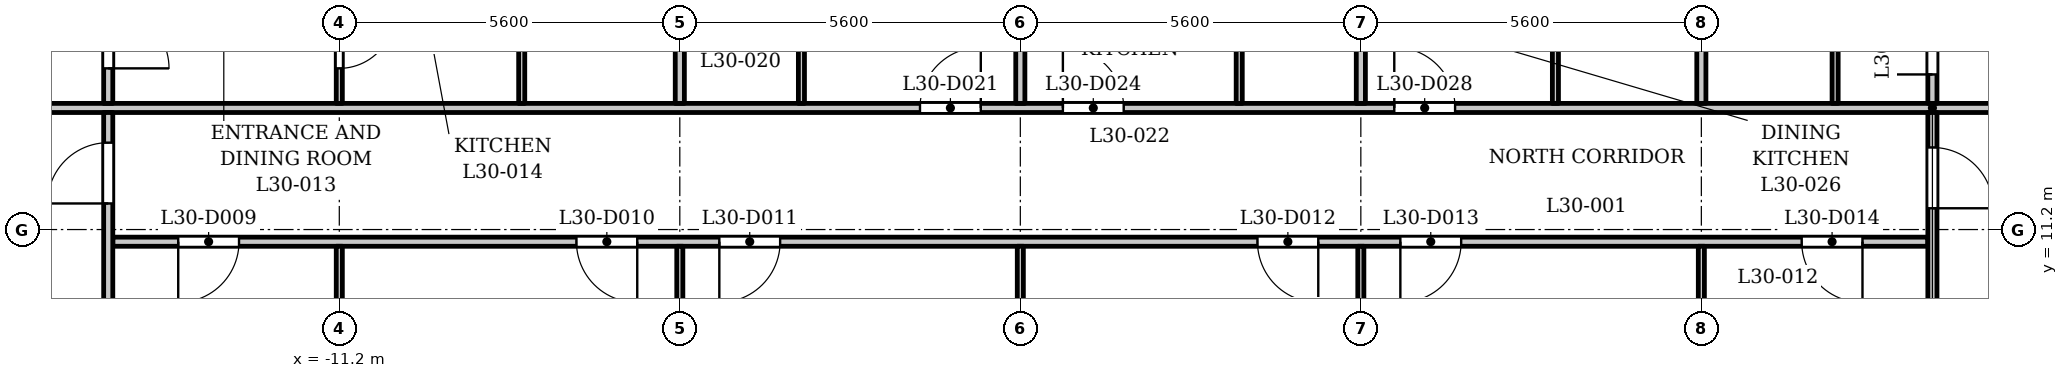
"""IFC4 building model, lengths in metres.
Left out: names, types, materials, properties, quantities, classifications, styles, units other than length and angle.
Written with IfcOpenShell. Run it as: python <this file> out.ifc"""

import sys

from ifc_helpers import new_model, si_unit, direction, frame, frame_2d, origin, place, context, subcontext, project, spatial, rectangle, extrude, element, fill, save


model = new_model("IFC4")
c1 = context("Model", 3, precision=1e-05, world=origin(), true_north=direction((0.0, 1.0)))
c2 = subcontext(c1, "Body", "Model", "MODEL_VIEW")
j1 = project(units=[si_unit("LENGTHUNIT", "METRE"), si_unit("PLANEANGLEUNIT", "RADIAN")], contexts=[c1])
p1 = place(None, origin())
s1 = spatial("IfcSite", under=j1, at=p1, CompositionType="ELEMENT")
p2 = place(p1, origin())
s2 = spatial("IfcBuilding", under=s1, at=p2, CompositionType="ELEMENT")
p3 = place(p2, frame((0.0, 0.0, 118.3)))
s3 = spatial("IfcBuildingStorey", under=s2, at=p3, CompositionType="ELEMENT", Elevation=118.3)
p4 = place(p3, frame((-14.925, 11.0, 0.0), z_axis=(0.0, 0.0, 1.0), x_axis=(1.0, 0.0, 0.0)))
e1 = element("IfcWall", 1, at=p4, inside=s3, PredefinedType="PARTITIONING", context=c2, shape_type="SweptSolid", body=[
    extrude(rectangle(XDim=29.85, YDim=0.15, at=frame_2d((14.925, 0.0))), origin(), (0.0, 0.0, 1.0), 3.2),
])
p5 = place(p4, frame((1.076, 0.0, 0.0)))
e2 = element("IfcOpeningElement", 2, at=p5, cuts=e1, PredefinedType="OPENING", context=c2, shape_type="SweptSolid", body=[
    extrude(rectangle(XDim=1.0, YDim=2.1, at=frame_2d((0.5, 1.05))), frame((0.0, 0.085, 0.0), z_axis=(0.0, -1.0, 0.0), x_axis=(1.0, 0.0, 0.0)), (0.0, 0.0, 1.0), 0.17),
])
p6 = place(p4, frame((7.625, 0.0, 0.0)))
e3 = element("IfcOpeningElement", 3, at=p6, cuts=e1, PredefinedType="OPENING", context=c2, shape_type="SweptSolid", body=[
    extrude(rectangle(XDim=1.0, YDim=2.1, at=frame_2d((0.5, 1.05))), frame((0.0, 0.085, 0.0), z_axis=(0.0, -1.0, 0.0), x_axis=(1.0, 0.0, 0.0)), (0.0, 0.0, 1.0), 0.17),
])
p7 = place(p4, frame((9.975, 0.0, 0.0)))
e4 = element("IfcOpeningElement", 4, at=p7, cuts=e1, PredefinedType="OPENING", context=c2, shape_type="SweptSolid", body=[
    extrude(rectangle(XDim=1.0, YDim=2.1, at=frame_2d((0.5, 1.05))), frame((0.0, 0.085, 0.0), z_axis=(0.0, -1.0, 0.0), x_axis=(1.0, 0.0, 0.0)), (0.0, 0.0, 1.0), 0.17),
])
p8 = place(p4, frame((18.825, 0.0, 0.0)))
e5 = element("IfcOpeningElement", 5, at=p8, cuts=e1, PredefinedType="OPENING", context=c2, shape_type="SweptSolid", body=[
    extrude(rectangle(XDim=1.0, YDim=2.1, at=frame_2d((0.5, 1.05))), frame((0.0, 0.085, 0.0), z_axis=(0.0, -1.0, 0.0), x_axis=(1.0, 0.0, 0.0)), (0.0, 0.0, 1.0), 0.17),
])
p9 = place(p4, frame((21.175, 0.0, 0.0)))
e6 = element("IfcOpeningElement", 6, at=p9, cuts=e1, PredefinedType="OPENING", context=c2, shape_type="SweptSolid", body=[
    extrude(rectangle(XDim=1.0, YDim=2.1, at=frame_2d((0.5, 1.05))), frame((0.0, 0.085, 0.0), z_axis=(0.0, -1.0, 0.0), x_axis=(1.0, 0.0, 0.0)), (0.0, 0.0, 1.0), 0.17),
])
p10 = place(p4, frame((27.775, 0.0, 0.0)))
e7 = element("IfcOpeningElement", 7, at=p10, cuts=e1, PredefinedType="OPENING", context=c2, shape_type="SweptSolid", body=[
    extrude(rectangle(XDim=1.0, YDim=2.1, at=frame_2d((0.5, 1.05))), frame((0.0, 0.085, 0.0), z_axis=(0.0, -1.0, 0.0), x_axis=(1.0, 0.0, 0.0)), (0.0, 0.0, 1.0), 0.17),
])
p11 = place(p3, frame((-17.4, 13.2, 0.0), z_axis=(0.0, 0.0, 1.0), x_axis=(1.0, 0.0, 0.0)))
e8 = element("IfcWall", 8, at=p11, inside=s3, PredefinedType="PARTITIONING", context=c2, shape_type="SweptSolid", body=[
    extrude(rectangle(XDim=34.8, YDim=0.15, at=frame_2d((17.4, 0.0))), origin(), (0.0, 0.0, 1.0), 3.2),
])
p12 = place(p11, frame((0.25, 0.0, 0.0)))
e9 = element("IfcOpeningElement", 9, at=p12, cuts=e8, PredefinedType="OPENING", context=c2, shape_type="SweptSolid", body=[
    extrude(rectangle(XDim=1.0, YDim=2.1, at=frame_2d((0.5, 1.05))), frame((0.0, 0.085, 0.0), z_axis=(0.0, -1.0, 0.0), x_axis=(1.0, 0.0, 0.0)), (0.0, 0.0, 1.0), 0.17),
])
p13 = place(p11, frame((33.65, 0.0, 0.0)))
e10 = element("IfcOpeningElement", 10, at=p13, cuts=e8, PredefinedType="OPENING", context=c2, shape_type="SweptSolid", body=[
    extrude(rectangle(XDim=1.0, YDim=2.1, at=frame_2d((0.5, 1.05))), frame((0.0, 0.085, 0.0), z_axis=(0.0, -1.0, 0.0), x_axis=(1.0, 0.0, 0.0)), (0.0, 0.0, 1.0), 0.17),
])
p14 = place(p11, frame((15.75, 0.0, 0.0)))
e11 = element("IfcOpeningElement", 11, at=p14, cuts=e8, PredefinedType="OPENING", context=c2, shape_type="SweptSolid", body=[
    extrude(rectangle(XDim=1.0, YDim=2.1, at=frame_2d((0.5, 1.05))), frame((0.0, 0.085, 0.0), z_axis=(0.0, -1.0, 0.0), x_axis=(1.0, 0.0, 0.0)), (0.0, 0.0, 1.0), 0.17),
])
p15 = place(p11, frame((18.1, 0.0, 0.0)))
e12 = element("IfcOpeningElement", 12, at=p15, cuts=e8, PredefinedType="OPENING", context=c2, shape_type="SweptSolid", body=[
    extrude(rectangle(XDim=1.0, YDim=2.1, at=frame_2d((0.5, 1.05))), frame((0.0, 0.085, 0.0), z_axis=(0.0, -1.0, 0.0), x_axis=(1.0, 0.0, 0.0)), (0.0, 0.0, 1.0), 0.17),
])
p16 = place(p11, frame((23.55, 0.0, 0.0)))
e13 = element("IfcOpeningElement", 13, at=p16, cuts=e8, PredefinedType="OPENING", context=c2, shape_type="SweptSolid", body=[
    extrude(rectangle(XDim=1.0, YDim=2.1, at=frame_2d((0.5, 1.05))), frame((0.0, 0.085, 0.0), z_axis=(0.0, -1.0, 0.0), x_axis=(1.0, 0.0, 0.0)), (0.0, 0.0, 1.0), 0.17),
])
p17 = place(p3, frame((-15.0, 6.769, 0.0), z_axis=(0.0, 0.0, 1.0), x_axis=(0.0, 1.0, 0.0)))
e14 = element("IfcWall", 14, at=p17, inside=s3, PredefinedType="PARTITIONING", context=c2, shape_type="SweptSolid", body=[
    extrude(rectangle(XDim=6.356, YDim=0.15, at=frame_2d((3.178, 0.0))), origin(), (0.0, 0.0, 1.0), 3.2),
])
p18 = place(p17, frame((4.86, 0.0, 0.0)))
e15 = element("IfcOpeningElement", 15, at=p18, cuts=e14, PredefinedType="OPENING", context=c2, shape_type="SweptSolid", body=[
    extrude(rectangle(XDim=1.0, YDim=2.1, at=frame_2d((0.5, 1.05))), frame((0.0, 0.085, 0.0), z_axis=(0.0, -1.0, 0.0), x_axis=(1.0, 0.0, 0.0)), (0.0, 0.0, 1.0), 0.17),
])
p19 = place(p3, frame((-15.0, 13.275, 0.0), z_axis=(0.0, 0.0, 1.0), x_axis=(0.0, 1.0, 0.0)))
e16 = element("IfcWall", 16, at=p19, inside=s3, PredefinedType="PARTITIONING", context=c2, shape_type="SweptSolid", body=[
    extrude(rectangle(XDim=2.05, YDim=0.15, at=frame_2d((1.025, 0.0))), origin(), (0.0, 0.0, 1.0), 3.2),
])
p20 = place(p19, frame((0.576, 0.0, 0.0)))
e17 = element("IfcOpeningElement", 17, at=p20, cuts=e16, PredefinedType="OPENING", context=c2, shape_type="SweptSolid", body=[
    extrude(rectangle(XDim=1.0, YDim=2.1, at=frame_2d((0.5, 1.05))), frame((0.0, 0.085, 0.0), z_axis=(0.0, -1.0, 0.0), x_axis=(1.0, 0.0, 0.0)), (0.0, 0.0, 1.0), 0.17),
])
p21 = place(p3, frame((-11.2, 7.32, 0.0), z_axis=(0.0, 0.0, 1.0), x_axis=(0.0, 1.0, 0.0)))
e18 = element("IfcWall", 18, at=p21, inside=s3, PredefinedType="PARTITIONING", context=c2, shape_type="SweptSolid", body=[
    extrude(rectangle(XDim=3.605, YDim=0.1, at=frame_2d((1.802, 0.0))), origin(), (0.0, 0.0, 1.0), 3.2),
])
p22 = place(p3, frame((-11.2, 13.275, 0.0), z_axis=(0.0, 0.0, 1.0), x_axis=(0.0, 1.0, 0.0)))
e19 = element("IfcWall", 19, at=p22, inside=s3, PredefinedType="PARTITIONING", context=c2, shape_type="SweptSolid", body=[
    extrude(rectangle(XDim=2.275, YDim=0.1, at=frame_2d((1.138, 0.0))), origin(), (0.0, 0.0, 1.0), 3.2),
])
p23 = place(p22, frame((0.576, 0.0, 0.0)))
e20 = element("IfcOpeningElement", 20, at=p23, cuts=e19, PredefinedType="OPENING", context=c2, shape_type="SweptSolid", body=[
    extrude(rectangle(XDim=0.9, YDim=2.1, at=frame_2d((0.45, 1.05))), frame((0.0, 0.06, 0.0), z_axis=(0.0, -1.0, 0.0), x_axis=(1.0, 0.0, 0.0)), (0.0, 0.0, 1.0), 0.12),
])
p24 = place(p3, frame((-8.2, 13.275, 0.0), z_axis=(0.0, 0.0, 1.0), x_axis=(0.0, 1.0, 0.0)))
e21 = element("IfcWall", 21, at=p24, inside=s3, PredefinedType="PARTITIONING", context=c2, shape_type="SweptSolid", body=[
    extrude(rectangle(XDim=2.275, YDim=0.1, at=frame_2d((1.138, 0.0))), origin(), (0.0, 0.0, 1.0), 3.2),
])
p25 = place(p3, frame((-5.6, 7.32, 0.0), z_axis=(0.0, 0.0, 1.0), x_axis=(0.0, 1.0, 0.0)))
e22 = element("IfcWall", 22, at=p25, inside=s3, PredefinedType="PARTITIONING", context=c2, shape_type="SweptSolid", body=[
    extrude(rectangle(XDim=3.605, YDim=0.1, at=frame_2d((1.802, 0.0))), origin(), (0.0, 0.0, 1.0), 3.2),
])
p26 = place(p3, frame((-5.6, 13.275, 0.0), z_axis=(0.0, 0.0, 1.0), x_axis=(0.0, 1.0, 0.0)))
e23 = element("IfcWall", 23, at=p26, inside=s3, PredefinedType="PARTITIONING", context=c2, shape_type="SweptSolid", body=[
    extrude(rectangle(XDim=2.275, YDim=0.15, at=frame_2d((1.138, 0.0))), origin(), (0.0, 0.0, 1.0), 3.2),
])
p27 = place(p3, frame((-3.6, 13.275, 0.0), z_axis=(0.0, 0.0, 1.0), x_axis=(0.0, 1.0, 0.0)))
e24 = element("IfcWall", 24, at=p27, inside=s3, PredefinedType="PARTITIONING", context=c2, shape_type="SweptSolid", body=[
    extrude(rectangle(XDim=2.275, YDim=0.1, at=frame_2d((1.138, 0.0))), origin(), (0.0, 0.0, 1.0), 3.2),
])
p28 = place(p3, frame((0.0, 7.32, 0.0), z_axis=(0.0, 0.0, 1.0), x_axis=(0.0, 1.0, 0.0)))
e25 = element("IfcWall", 25, at=p28, inside=s3, PredefinedType="PARTITIONING", context=c2, shape_type="SweptSolid", body=[
    extrude(rectangle(XDim=3.605, YDim=0.1, at=frame_2d((1.802, 0.0))), origin(), (0.0, 0.0, 1.0), 3.2),
])
p29 = place(p3, frame((0.0, 13.275, 0.0), z_axis=(0.0, 0.0, 1.0), x_axis=(0.0, 1.0, 0.0)))
e26 = element("IfcWall", 26, at=p29, inside=s3, PredefinedType="PARTITIONING", context=c2, shape_type="SweptSolid", body=[
    extrude(rectangle(XDim=2.275, YDim=0.15, at=frame_2d((1.138, 0.0))), origin(), (0.0, 0.0, 1.0), 3.2),
])
p30 = place(p3, frame((3.6, 13.275, 0.0), z_axis=(0.0, 0.0, 1.0), x_axis=(0.0, 1.0, 0.0)))
e27 = element("IfcWall", 27, at=p30, inside=s3, PredefinedType="PARTITIONING", context=c2, shape_type="SweptSolid", body=[
    extrude(rectangle(XDim=2.275, YDim=0.1, at=frame_2d((1.138, 0.0))), origin(), (0.0, 0.0, 1.0), 3.2),
])
p31 = place(p3, frame((5.6, 7.32, 0.0), z_axis=(0.0, 0.0, 1.0), x_axis=(0.0, 1.0, 0.0)))
e28 = element("IfcWall", 28, at=p31, inside=s3, PredefinedType="PARTITIONING", context=c2, shape_type="SweptSolid", body=[
    extrude(rectangle(XDim=3.605, YDim=0.1, at=frame_2d((1.802, 0.0))), origin(), (0.0, 0.0, 1.0), 3.2),
])
p32 = place(p3, frame((5.6, 13.275, 0.0), z_axis=(0.0, 0.0, 1.0), x_axis=(0.0, 1.0, 0.0)))
e29 = element("IfcWall", 29, at=p32, inside=s3, PredefinedType="PARTITIONING", context=c2, shape_type="SweptSolid", body=[
    extrude(rectangle(XDim=2.275, YDim=0.15, at=frame_2d((1.138, 0.0))), origin(), (0.0, 0.0, 1.0), 3.2),
])
p33 = place(p3, frame((8.8, 13.275, 0.0), z_axis=(0.0, 0.0, 1.0), x_axis=(0.0, 1.0, 0.0)))
e30 = element("IfcWall", 30, at=p33, inside=s3, PredefinedType="PARTITIONING", context=c2, shape_type="SweptSolid", body=[
    extrude(rectangle(XDim=2.275, YDim=0.1, at=frame_2d((1.138, 0.0))), origin(), (0.0, 0.0, 1.0), 3.2),
])
p34 = place(p3, frame((11.2, 7.32, 0.0), z_axis=(0.0, 0.0, 1.0), x_axis=(0.0, 1.0, 0.0)))
e31 = element("IfcWall", 31, at=p34, inside=s3, PredefinedType="PARTITIONING", context=c2, shape_type="SweptSolid", body=[
    extrude(rectangle(XDim=3.605, YDim=0.1, at=frame_2d((1.802, 0.0))), origin(), (0.0, 0.0, 1.0), 3.2),
])
p35 = place(p3, frame((11.2, 13.275, 0.0), z_axis=(0.0, 0.0, 1.0), x_axis=(0.0, 1.0, 0.0)))
e32 = element("IfcWall", 32, at=p35, inside=s3, PredefinedType="PARTITIONING", context=c2, shape_type="SweptSolid", body=[
    extrude(rectangle(XDim=2.275, YDim=0.15, at=frame_2d((1.138, 0.0))), origin(), (0.0, 0.0, 1.0), 3.2),
])
p36 = place(p3, frame((13.4, 13.275, 0.0), z_axis=(0.0, 0.0, 1.0), x_axis=(0.0, 1.0, 0.0)))
e33 = element("IfcWall", 33, at=p36, inside=s3, PredefinedType="PARTITIONING", context=c2, shape_type="SweptSolid", body=[
    extrude(rectangle(XDim=2.275, YDim=0.1, at=frame_2d((1.138, 0.0))), origin(), (0.0, 0.0, 1.0), 3.2),
])
p37 = place(p3, frame((15.0, 6.769, 0.0), z_axis=(0.0, 0.0, 1.0), x_axis=(0.0, 1.0, 0.0)))
e34 = element("IfcWall", 34, at=p37, inside=s3, PredefinedType="PARTITIONING", context=c2, shape_type="SweptSolid", body=[
    extrude(rectangle(XDim=6.356, YDim=0.15, at=frame_2d((3.178, 0.0))), origin(), (0.0, 0.0, 1.0), 3.2),
])
p38 = place(p37, frame((4.781, 0.0, 0.0)))
e35 = element("IfcOpeningElement", 35, at=p38, cuts=e34, PredefinedType="OPENING", context=c2, shape_type="SweptSolid", body=[
    extrude(rectangle(XDim=1.0, YDim=2.1, at=frame_2d((0.5, 1.05))), frame((0.0, 0.085, 0.0), z_axis=(0.0, -1.0, 0.0), x_axis=(1.0, 0.0, 0.0)), (0.0, 0.0, 1.0), 0.17),
])
p39 = place(p3, frame((15.0, 13.275, 0.0), z_axis=(0.0, 0.0, 1.0), x_axis=(0.0, 1.0, 0.0)))
e36 = element("IfcWall", 36, at=p39, inside=s3, PredefinedType="PARTITIONING", context=c2, shape_type="SweptSolid", body=[
    extrude(rectangle(XDim=2.05, YDim=0.15, at=frame_2d((1.025, 0.0))), origin(), (0.0, 0.0, 1.0), 3.2),
])
p40 = place(p39, frame((0.476, 0.0, 0.0)))
e37 = element("IfcOpeningElement", 37, at=p40, cuts=e36, PredefinedType="OPENING", context=c2, shape_type="SweptSolid", body=[
    extrude(rectangle(XDim=1.0, YDim=2.1, at=frame_2d((0.5, 1.05))), frame((0.0, 0.085, 0.0), z_axis=(0.0, -1.0, 0.0), x_axis=(1.0, 0.0, 0.0)), (0.0, 0.0, 1.0), 0.17),
])
p41 = place(p18, origin())
e38 = element("IfcDoor", 38, at=p41, inside=s3, OperationType="SINGLE_SWING_RIGHT", PredefinedType="DOOR", context=c2, shape_type="SweptSolid", body=[
    extrude(rectangle(XDim=1.0, YDim=2.1, at=frame_2d((0.5, 1.05))), frame((0.0, 0.025, 0.0), z_axis=(0.0, -1.0, 0.0), x_axis=(1.0, 0.0, 0.0)), (0.0, 0.0, 1.0), 0.05),
])
fill(e15, e38)
p42 = place(p38, origin())
e39 = element("IfcDoor", 39, at=p42, inside=s3, OperationType="SINGLE_SWING_LEFT", PredefinedType="DOOR", context=c2, shape_type="SweptSolid", body=[
    extrude(rectangle(XDim=1.0, YDim=2.1, at=frame_2d((0.5, 1.05))), frame((0.0, 0.025, 0.0), z_axis=(0.0, -1.0, 0.0), x_axis=(1.0, 0.0, 0.0)), (0.0, 0.0, 1.0), 0.05),
])
fill(e35, e39)
p43 = place(p5, origin())
e40 = element("IfcDoor", 40, at=p43, inside=s3, OperationType="SINGLE_SWING_LEFT", PredefinedType="DOOR", context=c2, shape_type="SweptSolid", body=[
    extrude(rectangle(XDim=1.0, YDim=2.1, at=frame_2d((0.5, 1.05))), frame((0.0, 0.025, 0.0), z_axis=(0.0, -1.0, 0.0), x_axis=(1.0, 0.0, 0.0)), (0.0, 0.0, 1.0), 0.05),
])
fill(e2, e40)
p44 = place(p6, origin())
e41 = element("IfcDoor", 41, at=p44, inside=s3, OperationType="SINGLE_SWING_RIGHT", PredefinedType="DOOR", context=c2, shape_type="SweptSolid", body=[
    extrude(rectangle(XDim=1.0, YDim=2.1, at=frame_2d((0.5, 1.05))), frame((0.0, 0.025, 0.0), z_axis=(0.0, -1.0, 0.0), x_axis=(1.0, 0.0, 0.0)), (0.0, 0.0, 1.0), 0.05),
])
fill(e3, e41)
p45 = place(p7, origin())
e42 = element("IfcDoor", 42, at=p45, inside=s3, OperationType="SINGLE_SWING_LEFT", PredefinedType="DOOR", context=c2, shape_type="SweptSolid", body=[
    extrude(rectangle(XDim=1.0, YDim=2.1, at=frame_2d((0.5, 1.05))), frame((0.0, 0.025, 0.0), z_axis=(0.0, -1.0, 0.0), x_axis=(1.0, 0.0, 0.0)), (0.0, 0.0, 1.0), 0.05),
])
fill(e4, e42)
p46 = place(p8, origin())
e43 = element("IfcDoor", 43, at=p46, inside=s3, OperationType="SINGLE_SWING_RIGHT", PredefinedType="DOOR", context=c2, shape_type="SweptSolid", body=[
    extrude(rectangle(XDim=1.0, YDim=2.1, at=frame_2d((0.5, 1.05))), frame((0.0, 0.025, 0.0), z_axis=(0.0, -1.0, 0.0), x_axis=(1.0, 0.0, 0.0)), (0.0, 0.0, 1.0), 0.05),
])
fill(e5, e43)
p47 = place(p9, origin())
e44 = element("IfcDoor", 44, at=p47, inside=s3, OperationType="SINGLE_SWING_LEFT", PredefinedType="DOOR", context=c2, shape_type="SweptSolid", body=[
    extrude(rectangle(XDim=1.0, YDim=2.1, at=frame_2d((0.5, 1.05))), frame((0.0, 0.025, 0.0), z_axis=(0.0, -1.0, 0.0), x_axis=(1.0, 0.0, 0.0)), (0.0, 0.0, 1.0), 0.05),
])
fill(e6, e44)
p48 = place(p10, origin())
e45 = element("IfcDoor", 45, at=p48, inside=s3, OperationType="SINGLE_SWING_RIGHT", PredefinedType="DOOR", context=c2, shape_type="SweptSolid", body=[
    extrude(rectangle(XDim=1.0, YDim=2.1, at=frame_2d((0.5, 1.05))), frame((0.0, 0.025, 0.0), z_axis=(0.0, -1.0, 0.0), x_axis=(1.0, 0.0, 0.0)), (0.0, 0.0, 1.0), 0.05),
])
fill(e7, e45)
p49 = place(p20, origin())
e46 = element("IfcDoor", 46, at=p49, inside=s3, OperationType="SINGLE_SWING_LEFT", PredefinedType="DOOR", context=c2, shape_type="SweptSolid", body=[
    extrude(rectangle(XDim=1.0, YDim=2.1, at=frame_2d((0.5, 1.05))), frame((0.0, 0.025, 0.0), z_axis=(0.0, -1.0, 0.0), x_axis=(1.0, 0.0, 0.0)), (0.0, 0.0, 1.0), 0.05),
])
fill(e17, e46)
p50 = place(p23, origin())
e47 = element("IfcDoor", 47, at=p50, inside=s3, OperationType="SINGLE_SWING_RIGHT", PredefinedType="DOOR", context=c2, shape_type="SweptSolid", body=[
    extrude(rectangle(XDim=0.9, YDim=2.1, at=frame_2d((0.45, 1.05))), frame((0.0, 0.025, 0.0), z_axis=(0.0, -1.0, 0.0), x_axis=(1.0, 0.0, 0.0)), (0.0, 0.0, 1.0), 0.05),
])
fill(e20, e47)
p51 = place(p14, origin())
e48 = element("IfcDoor", 48, at=p51, inside=s3, OperationType="SINGLE_SWING_LEFT", PredefinedType="DOOR", context=c2, shape_type="SweptSolid", body=[
    extrude(rectangle(XDim=1.0, YDim=2.1, at=frame_2d((0.5, 1.05))), frame((0.0, 0.025, 0.0), z_axis=(0.0, -1.0, 0.0), x_axis=(1.0, 0.0, 0.0)), (0.0, 0.0, 1.0), 0.05),
])
fill(e11, e48)
p52 = place(p15, origin())
e49 = element("IfcDoor", 49, at=p52, inside=s3, OperationType="SINGLE_SWING_RIGHT", PredefinedType="DOOR", context=c2, shape_type="SweptSolid", body=[
    extrude(rectangle(XDim=1.0, YDim=2.1, at=frame_2d((0.5, 1.05))), frame((0.0, 0.025, 0.0), z_axis=(0.0, -1.0, 0.0), x_axis=(1.0, 0.0, 0.0)), (0.0, 0.0, 1.0), 0.05),
])
fill(e12, e49)
p53 = place(p16, origin())
e50 = element("IfcDoor", 50, at=p53, inside=s3, OperationType="SINGLE_SWING_RIGHT", PredefinedType="DOOR", context=c2, shape_type="SweptSolid", body=[
    extrude(rectangle(XDim=1.0, YDim=2.1, at=frame_2d((0.5, 1.05))), frame((0.0, 0.025, 0.0), z_axis=(0.0, -1.0, 0.0), x_axis=(1.0, 0.0, 0.0)), (0.0, 0.0, 1.0), 0.05),
])
fill(e13, e50)
p54 = place(p40, origin())
e51 = element("IfcDoor", 51, at=p54, inside=s3, OperationType="SINGLE_SWING_RIGHT", PredefinedType="DOOR", context=c2, shape_type="SweptSolid", body=[
    extrude(rectangle(XDim=1.0, YDim=2.1, at=frame_2d((0.5, 1.05))), frame((0.0, 0.025, 0.0), z_axis=(0.0, -1.0, 0.0), x_axis=(1.0, 0.0, 0.0)), (0.0, 0.0, 1.0), 0.05),
])
fill(e37, e51)
save(model, sys.argv[1])
